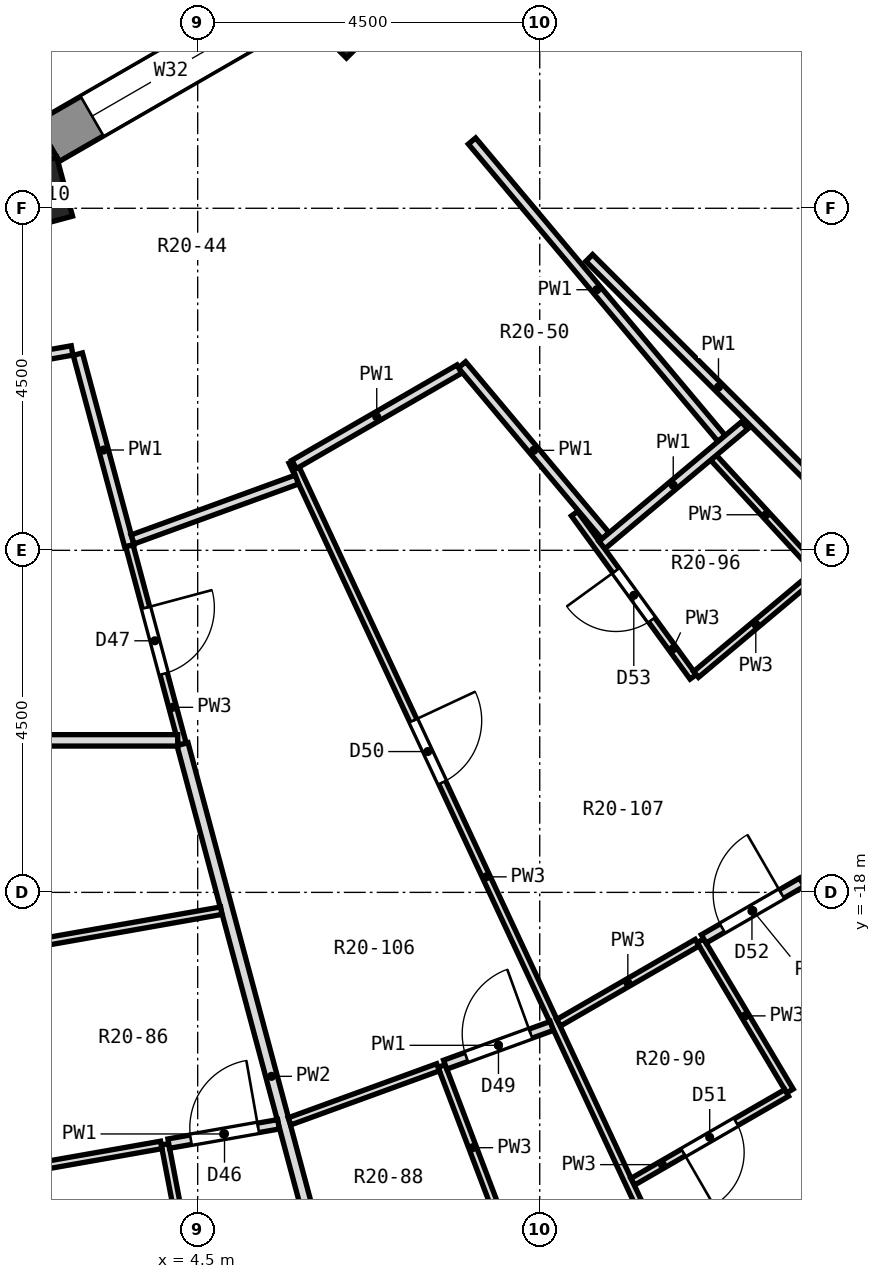
"""IFC4 building model, lengths in metres.
Left out: names, types, materials, properties, quantities, classifications, styles, units other than length and angle.
Written with IfcOpenShell. Run it as: python <this file> out.ifc"""

import sys

from ifc_helpers import new_model, si_unit, direction, frame, frame_2d, origin, origin_2d, place, context, subcontext, project, spatial, polyline, rectangle, outline, extrude, element, fill, save


model = new_model("IFC4")
c1 = context("Model", 3, precision=1e-05, world=origin(), true_north=direction((0.0, 1.0)))
c2 = subcontext(c1, "Body", "Model", "MODEL_VIEW")
j1 = project(units=[si_unit("LENGTHUNIT", "METRE"), si_unit("PLANEANGLEUNIT", "RADIAN")], contexts=[c1])
p1 = place(None, origin())
s1 = spatial("IfcSite", under=j1, at=p1, CompositionType="ELEMENT")
p2 = place(p1, origin())
s2 = spatial("IfcBuilding", under=s1, at=p2, CompositionType="ELEMENT")
p3 = place(p2, frame((0.0, 0.0, 121.6)))
s3 = spatial("IfcBuildingStorey", under=s2, at=p3, CompositionType="ELEMENT", Elevation=121.6)
for number, where, z_axis, x_axis in (
    (1, (2.364, -8.821, 0.0), (0.0, 0.0, 1.0), (0.259, -0.966, 0.0)),
    (2, (6.458, -6.458, 0.0), (0.0, 0.0, 1.0), (0.707, -0.707, 0.0)),
):
    element("IfcColumn", number, at=place(p3, frame(where, z_axis=z_axis, x_axis=x_axis)), inside=s3, PredefinedType="COLUMN", context=c2, shape_type="SweptSolid", body=[
        extrude(rectangle(XDim=0.8, YDim=0.8, at=origin_2d()), origin(), (0.0, 0.0, 1.0), 3.3),
    ])
p4 = place(p3, frame((11.719, -23.946, 0.0), z_axis=(0.0, 0.0, 1.0), x_axis=(0.866051847062, 0.499954196102, 0.0)))
e3 = element("IfcWall", 3, at=p4, inside=s3, PredefinedType="SOLIDWALL", context=c2, shape_type="SweptSolid", body=[
    extrude(rectangle(XDim=3.648, YDim=0.6, at=frame_2d((1.824, 0.0))), origin(), (0.0, 0.0, 1.0), 2.8),
])
p5 = place(p4, frame((0.674, 0.0, 0.9)))
e4 = element("IfcOpeningElement", 4, at=p5, cuts=e3, PredefinedType="OPENING", context=c2, shape_type="SweptSolid", body=[
    extrude(rectangle(XDim=2.3, YDim=1.8, at=frame_2d((1.15, 0.9))), frame((0.0, 0.312, 0.0), z_axis=(0.0, -1.0, 0.0), x_axis=(1.0, 0.0, 0.0)), (0.0, 0.0, 1.0), 0.624),
])
p6 = place(p3, frame((2.527, -8.125, 0.0), z_axis=(0.0, 0.0, 1.0), x_axis=(0.86604563398, 0.499964958637, 0.0)))
e5 = element("IfcWall", 5, at=p6, inside=s3, PredefinedType="SOLIDWALL", context=c2, shape_type="SweptSolid", body=[
    extrude(rectangle(XDim=3.747, YDim=0.6, at=frame_2d((1.874, 0.0))), origin(), (0.0, 0.0, 1.0), 2.8),
])
p7 = place(p6, frame((0.674, 0.0, 0.9)))
e6 = element("IfcOpeningElement", 6, at=p7, cuts=e5, PredefinedType="OPENING", context=c2, shape_type="SweptSolid", body=[
    extrude(rectangle(XDim=2.4, YDim=1.8, at=frame_2d((1.2, 0.9))), frame((0.0, 0.312, 0.0), z_axis=(0.0, -1.0, 0.0), x_axis=(1.0, 0.0, 0.0)), (0.0, 0.0, 1.0), 0.624),
])
p8 = place(p3, origin())
e7 = element("IfcWall", 7, at=p8, inside=s3, PredefinedType="SOLIDWALL", context=c2, shape_type="SweptSolid", body=[
    extrude(outline(polyline([(2.646, -8.331), (2.377, -7.865), (1.874, -8.0), (1.874, -8.538), (2.646, -8.331)])), origin(), (0.0, 0.0, 1.0), 2.8),
])
p9 = place(p3, frame((4.07, -21.314, 0.0), z_axis=(0.0, 0.0, 1.0), x_axis=(0.187292523019, -0.982304184467, 0.0)))
e8 = element("IfcWall", 8, at=p9, inside=s3, PredefinedType="PARTITIONING", context=c2, shape_type="SweptSolid", body=[
    extrude(rectangle(XDim=2.301, YDim=0.1, at=frame_2d((1.15, 0.0))), origin(), (0.0, 0.0, 1.0), 2.8),
])
p10 = place(p3, frame((2.923, -10.919, 0.0), z_axis=(0.0, 0.0, 1.0), x_axis=(0.259285993545, -0.965800586846, 0.0)))
e9 = element("IfcWall", 9, at=p10, inside=s3, PredefinedType="PARTITIONING", context=c2, shape_type="SweptSolid", body=[
    extrude(rectangle(XDim=2.611, YDim=0.125, at=frame_2d((1.306, 0.0))), origin(), (0.0, 0.0, 1.0), 2.8),
])
p11 = place(p3, frame((3.601, -13.44, 0.0), z_axis=(0.0, 0.0, 1.0), x_axis=(0.258787272881, -0.96593433907, 0.0)))
e10 = element("IfcWall", 10, at=p11, inside=s3, PredefinedType="PARTITIONING", context=c2, shape_type="SweptSolid", body=[
    extrude(rectangle(XDim=2.702, YDim=0.1, at=frame_2d((1.351, 0.0))), origin(), (0.0, 0.0, 1.0), 2.8),
])
p12 = place(p11, frame((0.844, 0.0, 0.0)))
e11 = element("IfcOpeningElement", 11, at=p12, cuts=e10, PredefinedType="OPENING", context=c2, shape_type="SweptSolid", body=[
    extrude(rectangle(XDim=0.9, YDim=2.1, at=frame_2d((0.45, 1.05))), frame((0.0, 0.062, 0.0), z_axis=(0.0, -1.0, 0.0), x_axis=(1.0, 0.0, 0.0)), (0.0, 0.0, 1.0), 0.124),
])
p13 = place(p3, frame((4.3, -16.05, 0.0), z_axis=(0.0, 0.0, 1.0), x_axis=(0.25880441681, -0.965929745809, 0.0)))
e12 = element("IfcWall", 12, at=p13, inside=s3, PredefinedType="PARTITIONING", context=c2, shape_type="SweptSolid", body=[
    extrude(rectangle(XDim=9.049, YDim=0.15, at=frame_2d((4.524, 0.0))), origin(), (0.0, 0.0, 1.0), 2.8),
])
p14 = place(p3, frame((7.709, -20.284, 0.0), z_axis=(0.0, 0.0, 1.0), x_axis=(0.355156544563, -0.934806840397, 0.0)))
e13 = element("IfcWall", 13, at=p14, inside=s3, PredefinedType="PARTITIONING", context=c2, shape_type="SweptSolid", body=[
    extrude(rectangle(XDim=2.3, YDim=0.1, at=frame_2d((1.15, 0.0))), origin(), (0.0, 0.0, 1.0), 2.8),
])
p15 = place(p3, frame((5.746, -12.331, 0.0), z_axis=(0.0, 0.0, 1.0), x_axis=(0.422888789848, -0.906181588547, 0.0)))
e14 = element("IfcWall", 14, at=p15, inside=s3, PredefinedType="PARTITIONING", context=c2, shape_type="SweptSolid", body=[
    extrude(rectangle(XDim=12.061, YDim=0.1, at=frame_2d((6.03, 0.0))), origin(), (0.0, 0.0, 1.0), 2.8),
])
p16 = place(p15, frame((3.761, 0.0, 0.0)))
e15 = element("IfcOpeningElement", 15, at=p16, cuts=e14, PredefinedType="OPENING", context=c2, shape_type="SweptSolid", body=[
    extrude(rectangle(XDim=0.9, YDim=2.1, at=frame_2d((0.45, 1.05))), frame((0.0, 0.062, 0.0), z_axis=(0.0, -1.0, 0.0), x_axis=(1.0, 0.0, 0.0)), (0.0, 0.0, 1.0), 0.124),
])
p17 = place(p3, frame((11.114, -18.637, 0.0), z_axis=(0.0, 0.0, 1.0), x_axis=(0.512043462342, -0.858959540766, 0.0)))
e16 = element("IfcWall", 16, at=p17, inside=s3, PredefinedType="PARTITIONING", context=c2, shape_type="SweptSolid", body=[
    extrude(rectangle(XDim=2.301, YDim=0.1, at=frame_2d((1.15, 0.0))), origin(), (0.0, 0.0, 1.0), 2.8),
])
p18 = place(p3, frame((9.457, -13.018, 0.0), z_axis=(0.0, 0.0, 1.0), x_axis=(0.588073257703, -0.808807667851, 0.0)))
e17 = element("IfcWall", 17, at=p18, inside=s3, PredefinedType="PARTITIONING", context=c2, shape_type="SweptSolid", body=[
    extrude(rectangle(XDim=2.655, YDim=0.1, at=frame_2d((1.327, 0.0))), origin(), (0.0, 0.0, 1.0), 2.8),
])
p19 = place(p18, frame((0.927, 0.0, 0.0)))
e18 = element("IfcOpeningElement", 18, at=p19, cuts=e17, PredefinedType="OPENING", context=c2, shape_type="SweptSolid", body=[
    extrude(rectangle(XDim=0.8, YDim=2.1, at=frame_2d((0.4, 1.05))), frame((0.0, 0.062, 0.0), z_axis=(0.0, -1.0, 0.0), x_axis=(1.0, 0.0, 0.0)), (0.0, 0.0, 1.0), 0.124),
])
p20 = place(p3, frame((7.977, -11.059, 0.0), z_axis=(0.0, 0.0, 1.0), x_axis=(0.642755449711, -0.766071427393, 0.0)))
e19 = element("IfcWall", 19, at=p20, inside=s3, PredefinedType="PARTITIONING", context=c2, shape_type="SweptSolid", body=[
    extrude(rectangle(XDim=2.938, YDim=0.125, at=frame_2d((1.469, 0.0))), origin(), (0.0, 0.0, 1.0), 2.8),
])
p21 = place(p3, frame((8.109, -8.115, 0.0), z_axis=(0.0, 0.0, 1.0), x_axis=(0.642822182591, -0.766015431678, 0.0)))
e20 = element("IfcWall", 20, at=p21, inside=s3, PredefinedType="PARTITIONING", context=c2, shape_type="SweptSolid", body=[
    extrude(rectangle(XDim=5.109, YDim=0.125, at=frame_2d((2.554, 0.0))), origin(), (0.0, 0.0, 1.0), 2.8),
])
p22 = place(p3, frame((11.286, -12.281, 0.0), z_axis=(0.0, 0.0, 1.0), x_axis=(0.676742772151, -0.736219546291, 0.0)))
e21 = element("IfcWall", 21, at=p22, inside=s3, PredefinedType="PARTITIONING", context=c2, shape_type="SweptSolid", body=[
    extrude(rectangle(XDim=2.04, YDim=0.1, at=frame_2d((1.02, 0.0))), origin(), (0.0, 0.0, 1.0), 2.8),
])
p23 = place(p3, frame((9.651, -9.653, 0.0), z_axis=(0.0, 0.0, 1.0), x_axis=(0.707386044222, -0.706827407816, 0.0)))
e22 = element("IfcWall", 22, at=p23, inside=s3, PredefinedType="PARTITIONING", context=c2, shape_type="SweptSolid", body=[
    extrude(rectangle(XDim=4.807, YDim=0.125, at=frame_2d((2.404, 0.0))), origin(), (0.0, 0.0, 1.0), 2.8),
])
p24 = place(p3, frame((-1.743, -16.0, 0.0), z_axis=(0.0, 0.0, 1.0), x_axis=(1.0, 0.0, 0.0)))
e23 = element("IfcWall", 23, at=p24, inside=s3, PredefinedType="PARTITIONING", context=c2, shape_type="SweptSolid", body=[
    extrude(rectangle(XDim=5.98, YDim=0.15, at=frame_2d((2.99, 0.0))), origin(), (0.0, 0.0, 1.0), 2.8),
])
p25 = place(p3, frame((1.947, -21.688, 0.0), z_axis=(0.0, 0.0, 1.0), x_axis=(0.984818559242, 0.173586881336, 0.0)))
e24 = element("IfcWall", 24, at=p25, inside=s3, PredefinedType="PARTITIONING", context=c2, shape_type="SweptSolid", body=[
    extrude(rectangle(XDim=2.105, YDim=0.1, at=frame_2d((1.053, 0.0))), origin(), (0.0, 0.0, 1.0), 2.8),
])
p26 = place(p3, frame((4.119, -21.305, 0.0), z_axis=(0.0, 0.0, 1.0), x_axis=(0.984835475574, 0.17349088175, 0.0)))
e25 = element("IfcWall", 25, at=p26, inside=s3, PredefinedType="PARTITIONING", context=c2, shape_type="SweptSolid", body=[
    extrude(rectangle(XDim=1.466, YDim=0.125, at=frame_2d((0.733, 0.0))), origin(), (0.0, 0.0, 1.0), 2.8),
])
p27 = place(p26, frame((0.295, 0.0, 0.0)))
e26 = element("IfcOpeningElement", 26, at=p27, cuts=e25, PredefinedType="OPENING", context=c2, shape_type="SweptSolid", body=[
    extrude(rectangle(XDim=0.9, YDim=2.1, at=frame_2d((0.45, 1.05))), frame((0.0, 0.074, 0.0), z_axis=(0.0, -1.0, 0.0), x_axis=(1.0, 0.0, 0.0)), (0.0, 0.0, 1.0), 0.149),
])
p28 = place(p3, frame((1.694, -18.79, 0.0), z_axis=(0.0, 0.0, 1.0), x_axis=(0.984811512808, 0.173626853457, 0.0)))
e27 = element("IfcWall", 27, at=p28, inside=s3, PredefinedType="PARTITIONING", context=c2, shape_type="SweptSolid", body=[
    extrude(rectangle(XDim=3.164, YDim=0.1, at=frame_2d((1.582, 0.0))), origin(), (0.0, 0.0, 1.0), 2.8),
])
p29 = place(p3, frame((1.042, -11.189, 0.0), z_axis=(0.0, 0.0, 1.0), x_axis=(0.984772836403, 0.173846083312, 0.0)))
e28 = element("IfcWall", 28, at=p29, inside=s3, PredefinedType="PARTITIONING", context=c2, shape_type="SweptSolid", body=[
    extrude(rectangle(XDim=1.834, YDim=0.125, at=frame_2d((0.917, 0.0))), origin(), (0.0, 0.0, 1.0), 2.8),
])
p30 = place(p3, frame((5.708, -21.012, 0.0), z_axis=(0.0, 0.0, 1.0), x_axis=(0.939690572239, 0.342025771609, 0.0)))
e29 = element("IfcWall", 29, at=p30, inside=s3, PredefinedType="PARTITIONING", context=c2, shape_type="SweptSolid", body=[
    extrude(rectangle(XDim=2.08, YDim=0.1, at=frame_2d((1.04, 0.0))), origin(), (0.0, 0.0, 1.0), 2.8),
])
p31 = place(p3, frame((7.756, -20.267, 0.0), z_axis=(0.0, 0.0, 1.0), x_axis=(0.939793423488, 0.341743063087, 0.0)))
e30 = element("IfcWall", 30, at=p31, inside=s3, PredefinedType="PARTITIONING", context=c2, shape_type="SweptSolid", body=[
    extrude(rectangle(XDim=1.492, YDim=0.125, at=frame_2d((0.746, 0.0))), origin(), (0.0, 0.0, 1.0), 2.8),
])
p32 = place(p31, frame((0.296, 0.0, 0.0)))
e31 = element("IfcOpeningElement", 31, at=p32, cuts=e30, PredefinedType="OPENING", context=c2, shape_type="SweptSolid", body=[
    extrude(rectangle(XDim=0.9, YDim=2.1, at=frame_2d((0.45, 1.05))), frame((0.0, 0.074, 0.0), z_axis=(0.0, -1.0, 0.0), x_axis=(1.0, 0.0, 0.0)), (0.0, 0.0, 1.0), 0.149),
])
p33 = place(p3, frame((3.644, -13.357, 0.0), z_axis=(0.0, 0.0, 1.0), x_axis=(0.939554653217, 0.342398968484, 0.0)))
e32 = element("IfcWall", 32, at=p33, inside=s3, PredefinedType="PARTITIONING", context=c2, shape_type="SweptSolid", body=[
    extrude(rectangle(XDim=2.301, YDim=0.125, at=frame_2d((1.15, 0.0))), origin(), (0.0, 0.0, 1.0), 2.8),
])
p34 = place(p3, frame((10.224, -21.807, 0.0), z_axis=(0.0, 0.0, 1.0), x_axis=(0.866076057046, 0.499912255713, 0.0)))
e33 = element("IfcWall", 33, at=p34, inside=s3, PredefinedType="PARTITIONING", context=c2, shape_type="SweptSolid", body=[
    extrude(rectangle(XDim=2.338, YDim=0.1, at=frame_2d((1.169, 0.0))), origin(), (0.0, 0.0, 1.0), 2.8),
])
p35 = place(p34, frame((0.769, 0.0, 0.0)))
e34 = element("IfcOpeningElement", 34, at=p35, cuts=e33, PredefinedType="OPENING", context=c2, shape_type="SweptSolid", body=[
    extrude(rectangle(XDim=0.8, YDim=2.1, at=frame_2d((0.4, 1.05))), frame((0.0, 0.062, 0.0), z_axis=(0.0, -1.0, 0.0), x_axis=(1.0, 0.0, 0.0)), (0.0, 0.0, 1.0), 0.124),
])
p36 = place(p3, frame((9.248, -19.715, 0.0), z_axis=(0.0, 0.0, 1.0), x_axis=(0.865870655861, 0.50026793553, 0.0)))
e35 = element("IfcWall", 35, at=p36, inside=s3, PredefinedType="PARTITIONING", context=c2, shape_type="SweptSolid", body=[
    extrude(rectangle(XDim=2.105, YDim=0.1, at=frame_2d((1.052, 0.0))), origin(), (0.0, 0.0, 1.0), 2.8),
])
p37 = place(p3, frame((11.157, -18.612, 0.0), z_axis=(0.0, 0.0, 1.0), x_axis=(0.866060276884, 0.499939593154, 0.0)))
e36 = element("IfcWall", 36, at=p37, inside=s3, PredefinedType="PARTITIONING", context=c2, shape_type="SweptSolid", body=[
    extrude(rectangle(XDim=1.492, YDim=0.125, at=frame_2d((0.746, 0.0))), origin(), (0.0, 0.0, 1.0), 2.8),
])
p38 = place(p37, frame((0.283, 0.0, 0.0)))
e37 = element("IfcOpeningElement", 37, at=p38, cuts=e36, PredefinedType="OPENING", context=c2, shape_type="SweptSolid", body=[
    extrude(rectangle(XDim=0.9, YDim=2.1, at=frame_2d((0.45, 1.05))), frame((0.0, 0.074, 0.0), z_axis=(0.0, -1.0, 0.0), x_axis=(1.0, 0.0, 0.0)), (0.0, 0.0, 1.0), 0.149),
])
p39 = place(p3, frame((5.769, -12.371, 0.0), z_axis=(0.0, 0.0, 1.0), x_axis=(0.865838856669, 0.500322969973, 0.0)))
e38 = element("IfcWall", 38, at=p39, inside=s3, PredefinedType="PARTITIONING", context=c2, shape_type="SweptSolid", body=[
    extrude(rectangle(XDim=2.51, YDim=0.125, at=frame_2d((1.255, 0.0))), origin(), (0.0, 0.0, 1.0), 2.8),
])
p40 = place(p3, frame((11.056, -15.133, 0.0), z_axis=(0.0, 0.0, 1.0), x_axis=(0.766442887367, 0.642312463217, 0.0)))
e39 = element("IfcWall", 39, at=p40, inside=s3, PredefinedType="PARTITIONING", context=c2, shape_type="SweptSolid", body=[
    extrude(rectangle(XDim=2.051, YDim=0.1, at=frame_2d((1.026, 0.0))), origin(), (0.0, 0.0, 1.0), 2.8),
])
p41 = place(p3, frame((9.819, -13.43, 0.0), z_axis=(0.0, 0.0, 1.0), x_axis=(0.76617412247, 0.642633032186, 0.0)))
e40 = element("IfcWall", 40, at=p41, inside=s3, PredefinedType="PARTITIONING", context=c2, shape_type="SweptSolid", body=[
    extrude(rectangle(XDim=2.448, YDim=0.125, at=frame_2d((1.224, 0.0))), origin(), (0.0, 0.0, 1.0), 2.8),
])
p42 = place(p7, origin())
e41 = element("IfcWindow", 41, at=p42, inside=s3, PartitioningType="SINGLE_PANEL", PredefinedType="WINDOW", context=c2, shape_type="SweptSolid", body=[
    extrude(rectangle(XDim=2.4, YDim=1.8, at=frame_2d((1.2, 0.9))), frame((0.0, -0.12, 0.0), z_axis=(0.0, -1.0, 0.0), x_axis=(1.0, 0.0, 0.0)), (0.0, 0.0, 1.0), 0.06),
])
fill(e6, e41)
p43 = place(p27, origin())
e42 = element("IfcDoor", 42, at=p43, inside=s3, OperationType="SINGLE_SWING_RIGHT", PredefinedType="DOOR", context=c2, shape_type="SweptSolid", body=[
    extrude(rectangle(XDim=0.9, YDim=2.1, at=frame_2d((0.45, 1.05))), frame((0.0, 0.025, 0.0), z_axis=(0.0, -1.0, 0.0), x_axis=(1.0, 0.0, 0.0)), (0.0, 0.0, 1.0), 0.05),
])
fill(e26, e42)
p44 = place(p12, origin())
e43 = element("IfcDoor", 43, at=p44, inside=s3, OperationType="SINGLE_SWING_LEFT", PredefinedType="DOOR", context=c2, shape_type="SweptSolid", body=[
    extrude(rectangle(XDim=0.9, YDim=2.1, at=frame_2d((0.45, 1.05))), frame((0.0, 0.025, 0.0), z_axis=(0.0, -1.0, 0.0), x_axis=(1.0, 0.0, 0.0)), (0.0, 0.0, 1.0), 0.05),
])
fill(e11, e43)
p45 = place(p32, origin())
e44 = element("IfcDoor", 44, at=p45, inside=s3, OperationType="SINGLE_SWING_RIGHT", PredefinedType="DOOR", context=c2, shape_type="SweptSolid", body=[
    extrude(rectangle(XDim=0.9, YDim=2.1, at=frame_2d((0.45, 1.05))), frame((0.0, 0.025, 0.0), z_axis=(0.0, -1.0, 0.0), x_axis=(1.0, 0.0, 0.0)), (0.0, 0.0, 1.0), 0.05),
])
fill(e31, e44)
p46 = place(p16, origin())
e45 = element("IfcDoor", 45, at=p46, inside=s3, OperationType="SINGLE_SWING_LEFT", PredefinedType="DOOR", context=c2, shape_type="SweptSolid", body=[
    extrude(rectangle(XDim=0.9, YDim=2.1, at=frame_2d((0.45, 1.05))), frame((0.0, 0.025, 0.0), z_axis=(0.0, -1.0, 0.0), x_axis=(1.0, 0.0, 0.0)), (0.0, 0.0, 1.0), 0.05),
])
fill(e15, e45)
p47 = place(p35, frame((0.8, 0.0, 0.0), z_axis=(0.0, 0.0, 1.0), x_axis=(-1.0, 0.0, 0.0)))
e46 = element("IfcDoor", 46, at=p47, inside=s3, OperationType="SINGLE_SWING_RIGHT", PredefinedType="DOOR", context=c2, shape_type="SweptSolid", body=[
    extrude(rectangle(XDim=0.8, YDim=2.1, at=frame_2d((0.4, 1.05))), frame((0.0, 0.025, 0.0), z_axis=(0.0, -1.0, 0.0), x_axis=(1.0, 0.0, 0.0)), (0.0, 0.0, 1.0), 0.05),
])
fill(e34, e46)
p48 = place(p38, origin())
e47 = element("IfcDoor", 47, at=p48, inside=s3, OperationType="SINGLE_SWING_RIGHT", PredefinedType="DOOR", context=c2, shape_type="SweptSolid", body=[
    extrude(rectangle(XDim=0.9, YDim=2.1, at=frame_2d((0.45, 1.05))), frame((0.0, 0.025, 0.0), z_axis=(0.0, -1.0, 0.0), x_axis=(1.0, 0.0, 0.0)), (0.0, 0.0, 1.0), 0.05),
])
fill(e37, e47)
p49 = place(p19, frame((0.8, 0.0, 0.0), z_axis=(0.0, 0.0, 1.0), x_axis=(-1.0, 0.0, 0.0)))
e48 = element("IfcDoor", 48, at=p49, inside=s3, OperationType="SINGLE_SWING_RIGHT", PredefinedType="DOOR", context=c2, shape_type="SweptSolid", body=[
    extrude(rectangle(XDim=0.8, YDim=2.1, at=frame_2d((0.4, 1.05))), frame((0.0, 0.025, 0.0), z_axis=(0.0, -1.0, 0.0), x_axis=(1.0, 0.0, 0.0)), (0.0, 0.0, 1.0), 0.05),
])
fill(e18, e48)
save(model, sys.argv[1])
